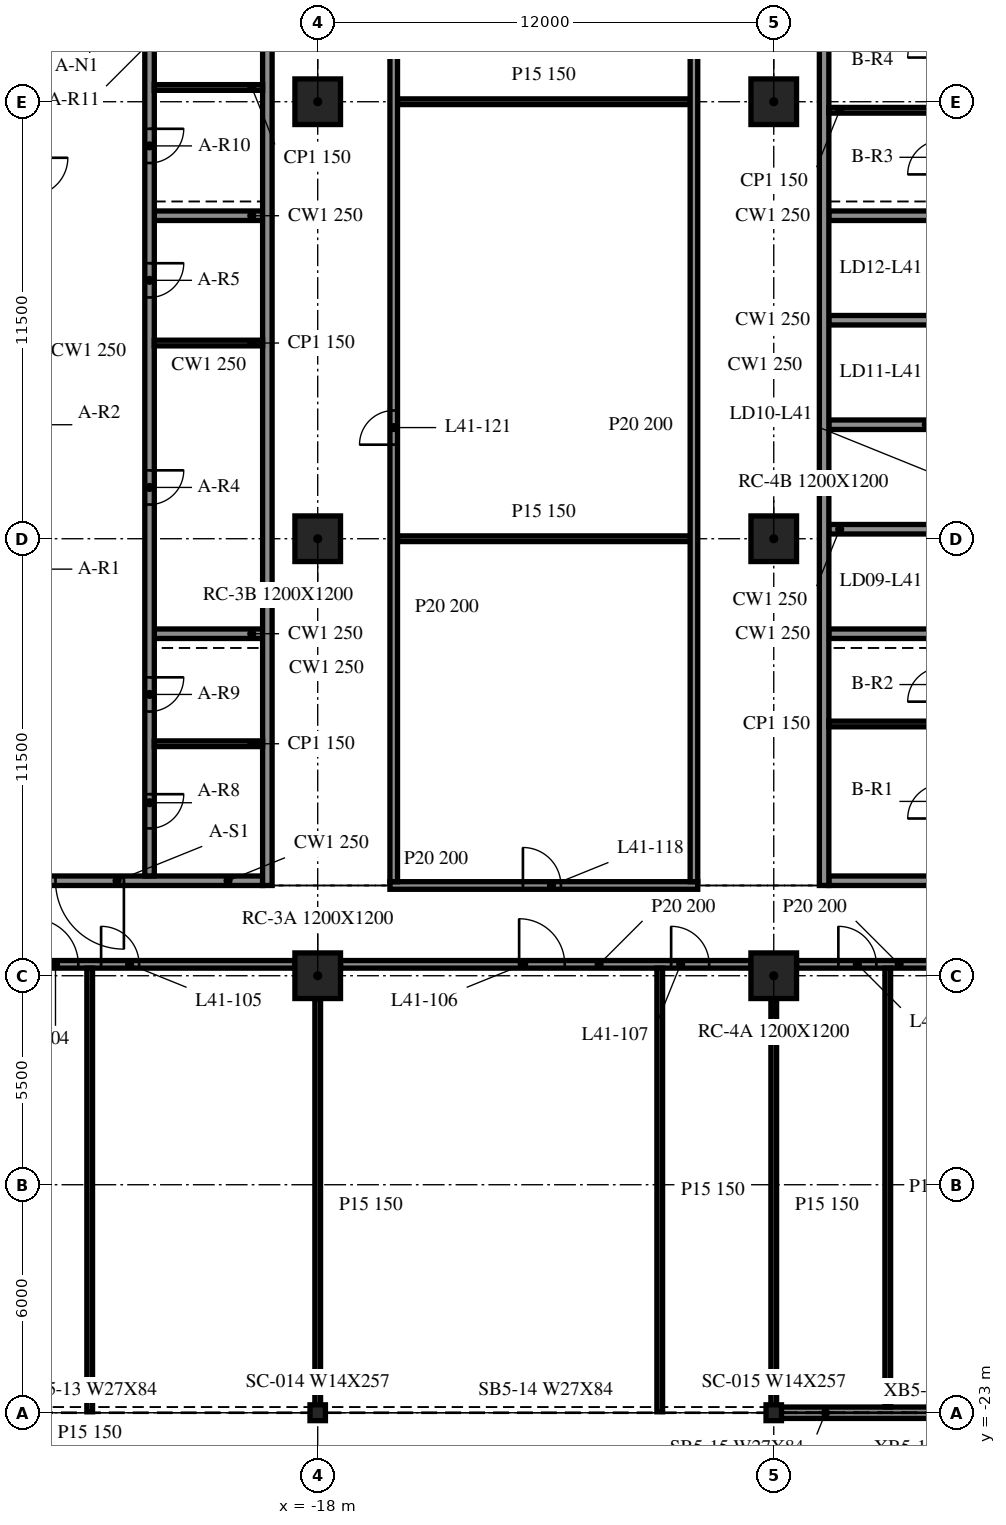
"""IFC4 building model, lengths in metres.
Left out: names, types, materials, properties, quantities, classifications, styles, units other than length and angle.
Written with IfcOpenShell. Run it as: python <this file> out.ifc"""

import sys

from ifc_helpers import new_model, si_unit, direction, frame, frame_2d, origin, origin_2d, place, context, subcontext, project, spatial, rectangle, i_section, extrude, element, fill, save


model = new_model("IFC4")
c1 = context("Model", 3, precision=1e-05, world=origin(), true_north=direction((0.0, 1.0)))
c2 = subcontext(c1, "Body", "Model", "MODEL_VIEW")
j1 = project(units=[si_unit("LENGTHUNIT", "METRE"), si_unit("PLANEANGLEUNIT", "RADIAN")], contexts=[c1])
p1 = place(None, origin())
s1 = spatial("IfcSite", under=j1, at=p1, CompositionType="ELEMENT")
p2 = place(p1, origin())
s2 = spatial("IfcBuilding", under=s1, at=p2, CompositionType="ELEMENT")
p3 = place(p2, frame((0.0, 0.0, 174.4)))
s3 = spatial("IfcBuildingStorey", under=s2, at=p3, CompositionType="ELEMENT", Elevation=174.4)
for number, where, z_axis, x_axis in (
    (1, (-18.0, -11.5, -0.34), (0.0, 0.0, 1.0), (1.0, 0.0, 0.0)),
    (2, (-18.0, 0.0, -0.34), (0.0, 0.0, 1.0), (1.0, 0.0, 0.0)),
    (3, (-18.0, 11.5, -0.34), (0.0, 0.0, 1.0), (1.0, 0.0, 0.0)),
    (4, (-6.0, -11.5, -0.34), (0.0, 0.0, 1.0), (1.0, 0.0, 0.0)),
    (5, (-6.0, 0.0, -0.34), (0.0, 0.0, 1.0), (1.0, 0.0, 0.0)),
    (6, (-6.0, 11.5, -0.34), (0.0, 0.0, 1.0), (1.0, 0.0, 0.0)),
):
    element("IfcColumn", number, at=place(p3, frame(where, z_axis=z_axis, x_axis=x_axis)), inside=s3, PredefinedType="COLUMN", context=c2, shape_type="SweptSolid", body=[
        extrude(rectangle(XDim=1.2, YDim=1.2, at=origin_2d()), origin(), (0.0, 0.0, 1.0), 3.8),
    ])
for number, where, z_axis, x_axis in (
    (7, (-18.0, -23.0, -0.34), (0.0, 0.0, 1.0), (1.0, 0.0, 0.0)),
    (8, (-6.0, -23.0, -0.34), (0.0, 0.0, 1.0), (1.0, 0.0, 0.0)),
):
    element("IfcColumn", number, at=place(p3, frame(where, z_axis=z_axis, x_axis=x_axis)), inside=s3, PredefinedType="COLUMN", context=c2, shape_type="SweptSolid", body=[
        extrude(i_section(OverallWidth=0.406, OverallDepth=0.417, WebThickness=0.03, FlangeThickness=0.048, at=origin_2d()), origin(), (0.0, 0.0, 1.0), 3.8),
    ])
p4 = place(p3, frame((-5.985, -23.0, 0.0), z_axis=(0.0, 0.0, 1.0), x_axis=(1.0, 0.0, 0.0)))
e9 = element("IfcWall", 9, at=p4, inside=s3, PredefinedType="NOTDEFINED", context=c2, shape_type="SweptSolid", body=[
    extrude(rectangle(XDim=11.97, YDim=0.3, at=frame_2d((5.985, 0.0))), origin(), (0.0, 0.0, 1.0), 2.782),
])
p5 = place(p3, frame((-19.325, -9.125, 0.0), z_axis=(0.0, 0.0, 1.0), x_axis=(0.0, 1.0, 0.0)))
e10 = element("IfcWall", 10, at=p5, inside=s3, PredefinedType="SOLIDWALL", context=c2, shape_type="SweptSolid", body=[
    extrude(rectangle(XDim=24.25, YDim=0.25, at=frame_2d((12.125, 0.0))), origin(), (0.0, 0.0, 1.0), 3.46),
])
p6 = place(p3, frame((-19.45, -9.0, 0.0), z_axis=(0.0, 0.0, 1.0), x_axis=(-1.0, 0.0, 0.0)))
e11 = element("IfcWall", 11, at=p6, inside=s3, PredefinedType="SOLIDWALL", context=c2, shape_type="SweptSolid", body=[
    extrude(rectangle(XDim=9.1, YDim=0.25, at=frame_2d((4.55, 0.0))), origin(), (0.0, 0.0, 1.0), 3.46),
])
p7 = place(p6, frame((3.65, 0.0, 0.0)))
e12 = element("IfcOpeningElement", 12, at=p7, cuts=e11, PredefinedType="OPENING", context=c2, shape_type="SweptSolid", body=[
    extrude(rectangle(XDim=1.8, YDim=2.1, at=frame_2d((0.9, 1.05))), frame((0.0, 0.135, 0.0), z_axis=(0.0, -1.0, 0.0), x_axis=(1.0, 0.0, 0.0)), (0.0, 0.0, 1.0), 0.27),
])
p8 = place(p3, frame((-22.425, 14.875, 0.0), z_axis=(0.0, 0.0, 1.0), x_axis=(0.0, -1.0, 0.0)))
e13 = element("IfcWall", 13, at=p8, inside=s3, PredefinedType="SOLIDWALL", context=c2, shape_type="SweptSolid", body=[
    extrude(rectangle(XDim=23.75, YDim=0.25, at=frame_2d((11.875, 0.0))), origin(), (0.0, 0.0, 1.0), 3.46),
])
p9 = place(p8, frame((13.075, 0.0, 0.0)))
e14 = element("IfcOpeningElement", 14, at=p9, cuts=e13, PredefinedType="OPENING", context=c2, shape_type="SweptSolid", body=[
    extrude(rectangle(XDim=0.9, YDim=2.1, at=frame_2d((0.45, 1.05))), frame((0.0, 0.135, 0.0), z_axis=(0.0, -1.0, 0.0), x_axis=(1.0, 0.0, 0.0)), (0.0, 0.0, 1.0), 0.27),
])
p10 = place(p8, frame((7.625, 0.0, 0.0)))
e15 = element("IfcOpeningElement", 15, at=p10, cuts=e13, PredefinedType="OPENING", context=c2, shape_type="SweptSolid", body=[
    extrude(rectangle(XDim=0.9, YDim=2.1, at=frame_2d((0.45, 1.05))), frame((0.0, 0.135, 0.0), z_axis=(0.0, -1.0, 0.0), x_axis=(1.0, 0.0, 0.0)), (0.0, 0.0, 1.0), 0.27),
])
p11 = place(p8, frame((21.597, 0.0, 0.0)))
e16 = element("IfcOpeningElement", 16, at=p11, cuts=e13, PredefinedType="OPENING", context=c2, shape_type="SweptSolid", body=[
    extrude(rectangle(XDim=0.9, YDim=2.1, at=frame_2d((0.45, 1.05))), frame((0.0, 0.135, 0.0), z_axis=(0.0, -1.0, 0.0), x_axis=(1.0, 0.0, 0.0)), (0.0, 0.0, 1.0), 0.27),
])
p12 = place(p8, frame((18.522, 0.0, 0.0)))
e17 = element("IfcOpeningElement", 17, at=p12, cuts=e13, PredefinedType="OPENING", context=c2, shape_type="SweptSolid", body=[
    extrude(rectangle(XDim=0.9, YDim=2.1, at=frame_2d((0.45, 1.05))), frame((0.0, 0.135, 0.0), z_axis=(0.0, -1.0, 0.0), x_axis=(1.0, 0.0, 0.0)), (0.0, 0.0, 1.0), 0.27),
])
p13 = place(p8, frame((4.087, 0.0, 0.0)))
e18 = element("IfcOpeningElement", 18, at=p13, cuts=e13, PredefinedType="OPENING", context=c2, shape_type="SweptSolid", body=[
    extrude(rectangle(XDim=0.9, YDim=2.1, at=frame_2d((0.45, 1.05))), frame((0.0, 0.135, 0.0), z_axis=(0.0, -1.0, 0.0), x_axis=(1.0, 0.0, 0.0)), (0.0, 0.0, 1.0), 0.27),
])
p14 = place(p8, frame((1.012, 0.0, 0.0)))
e19 = element("IfcOpeningElement", 19, at=p14, cuts=e13, PredefinedType="OPENING", context=c2, shape_type="SweptSolid", body=[
    extrude(rectangle(XDim=0.9, YDim=2.1, at=frame_2d((0.45, 1.05))), frame((0.0, 0.135, 0.0), z_axis=(0.0, -1.0, 0.0), x_axis=(1.0, 0.0, 0.0)), (0.0, 0.0, 1.0), 0.27),
])
for number, where, z_axis, x_axis in (
    (20, (-22.3, -2.5, 0.0), (0.0, 0.0, 1.0), (1.0, 0.0, 0.0)),
    (21, (-22.3, 8.5, 0.0), (0.0, 0.0, 1.0), (1.0, 0.0, 0.0)),
):
    element("IfcWall", number, at=place(p3, frame(where, z_axis=z_axis, x_axis=x_axis)), inside=s3, PredefinedType="SOLIDWALL", context=c2, shape_type="SweptSolid", body=[
        extrude(rectangle(XDim=2.85, YDim=0.25, at=frame_2d((1.425, 0.0))), origin(), (0.0, 0.0, 1.0), 3.46),
    ])
for number, where, z_axis, x_axis in (
    (22, (-22.3, 5.15, 0.0), (0.0, 0.0, 1.0), (1.0, 0.0, 0.0)),
    (23, (-22.3, -5.395, 0.0), (0.0, 0.0, 1.0), (1.0, 0.0, 0.0)),
    (24, (-22.3, 11.875, 0.0), (0.0, 0.0, 1.0), (1.0, 0.0, 0.0)),
):
    element("IfcWall", number, at=place(p3, frame(where, z_axis=z_axis, x_axis=x_axis)), inside=s3, PredefinedType="PARTITIONING", context=c2, shape_type="SweptSolid", body=[
        extrude(rectangle(XDim=2.85, YDim=0.15, at=frame_2d((1.425, 0.0))), origin(), (0.0, 0.0, 1.0), 3.46),
    ])
p15 = place(p3, frame((-4.675, 15.125, 0.0), z_axis=(0.0, 0.0, 1.0), x_axis=(0.0, -1.0, 0.0)))
e25 = element("IfcWall", 25, at=p15, inside=s3, PredefinedType="SOLIDWALL", context=c2, shape_type="SweptSolid", body=[
    extrude(rectangle(XDim=24.25, YDim=0.25, at=frame_2d((12.125, 0.0))), origin(), (0.0, 0.0, 1.0), 3.46),
])
p16 = place(p3, frame((4.55, -9.0, 0.0), z_axis=(0.0, 0.0, 1.0), x_axis=(-1.0, 0.0, 0.0)))
e26 = element("IfcWall", 26, at=p16, inside=s3, PredefinedType="SOLIDWALL", context=c2, shape_type="SweptSolid", body=[
    extrude(rectangle(XDim=9.1, YDim=0.25, at=frame_2d((4.55, 0.0))), origin(), (0.0, 0.0, 1.0), 3.46),
])
p17 = place(p16, frame((3.65, 0.0, 0.0)))
e27 = element("IfcOpeningElement", 27, at=p17, cuts=e26, PredefinedType="OPENING", context=c2, shape_type="SweptSolid", body=[
    extrude(rectangle(XDim=1.8, YDim=2.1, at=frame_2d((0.9, 1.05))), frame((0.0, 0.135, 0.0), z_axis=(0.0, -1.0, 0.0), x_axis=(1.0, 0.0, 0.0)), (0.0, 0.0, 1.0), 0.27),
])
for number, where, z_axis, x_axis in (
    (28, (-4.55, -2.5, 0.0), (0.0, 0.0, 1.0), (1.0, 0.0, 0.0)),
    (29, (-4.55, 0.25, 0.0), (0.0, 0.0, 1.0), (1.0, 0.0, 0.0)),
    (30, (-4.55, 3.0, 0.0), (0.0, 0.0, 1.0), (1.0, 0.0, 0.0)),
    (31, (-4.55, 5.75, 0.0), (0.0, 0.0, 1.0), (1.0, 0.0, 0.0)),
    (32, (-4.55, 8.5, 0.0), (0.0, 0.0, 1.0), (1.0, 0.0, 0.0)),
):
    element("IfcWall", number, at=place(p3, frame(where, z_axis=z_axis, x_axis=x_axis)), inside=s3, PredefinedType="SOLIDWALL", context=c2, shape_type="SweptSolid", body=[
        extrude(rectangle(XDim=2.85, YDim=0.25, at=frame_2d((1.425, 0.0))), origin(), (0.0, 0.0, 1.0), 3.46),
    ])
for number, where, z_axis, x_axis in (
    (33, (-4.55, -4.875, 0.0), (0.0, 0.0, 1.0), (1.0, 0.0, 0.0)),
    (34, (-4.55, 11.275, 0.0), (0.0, 0.0, 1.0), (1.0, 0.0, 0.0)),
):
    element("IfcWall", number, at=place(p3, frame(where, z_axis=z_axis, x_axis=x_axis)), inside=s3, PredefinedType="PARTITIONING", context=c2, shape_type="SweptSolid", body=[
        extrude(rectangle(XDim=2.85, YDim=0.15, at=frame_2d((1.425, 0.0))), origin(), (0.0, 0.0, 1.0), 3.46),
    ])
p18 = place(p3, frame((-29.4, -11.2, 0.0), z_axis=(0.0, 0.0, 1.0), x_axis=(1.0, 0.0, 0.0)))
e35 = element("IfcWall", 35, at=p18, inside=s3, PredefinedType="PARTITIONING", context=c2, shape_type="SweptSolid", body=[
    extrude(rectangle(XDim=10.8, YDim=0.2, at=frame_2d((5.4, 0.0))), origin(), (0.0, 0.0, 1.0), 3.46),
])
p19 = place(p18, frame((3.9, 0.0, 0.0)))
e36 = element("IfcOpeningElement", 36, at=p19, cuts=e35, PredefinedType="OPENING", context=c2, shape_type="SweptSolid", body=[
    extrude(rectangle(XDim=1.2, YDim=2.1, at=frame_2d((0.6, 1.05))), frame((0.0, 0.11, 0.0), z_axis=(0.0, -1.0, 0.0), x_axis=(1.0, 0.0, 0.0)), (0.0, 0.0, 1.0), 0.22),
])
p20 = place(p18, frame((5.7, 0.0, 0.0)))
e37 = element("IfcOpeningElement", 37, at=p20, cuts=e35, PredefinedType="OPENING", context=c2, shape_type="SweptSolid", body=[
    extrude(rectangle(XDim=1.0, YDim=2.1, at=frame_2d((0.5, 1.05))), frame((0.0, 0.11, 0.0), z_axis=(0.0, -1.0, 0.0), x_axis=(1.0, 0.0, 0.0)), (0.0, 0.0, 1.0), 0.22),
])
p21 = place(p3, frame((-17.4, -11.2, 0.0), z_axis=(0.0, 0.0, 1.0), x_axis=(1.0, 0.0, 0.0)))
e38 = element("IfcWall", 38, at=p21, inside=s3, PredefinedType="PARTITIONING", context=c2, shape_type="SweptSolid", body=[
    extrude(rectangle(XDim=10.8, YDim=0.2, at=frame_2d((5.4, 0.0))), origin(), (0.0, 0.0, 1.0), 3.46),
])
p22 = place(p21, frame((4.7, 0.0, 0.0)))
e39 = element("IfcOpeningElement", 39, at=p22, cuts=e38, PredefinedType="OPENING", context=c2, shape_type="SweptSolid", body=[
    extrude(rectangle(XDim=1.2, YDim=2.1, at=frame_2d((0.6, 1.05))), frame((0.0, 0.11, 0.0), z_axis=(0.0, -1.0, 0.0), x_axis=(1.0, 0.0, 0.0)), (0.0, 0.0, 1.0), 0.22),
])
p23 = place(p21, frame((8.7, 0.0, 0.0)))
e40 = element("IfcOpeningElement", 40, at=p23, cuts=e38, PredefinedType="OPENING", context=c2, shape_type="SweptSolid", body=[
    extrude(rectangle(XDim=1.0, YDim=2.1, at=frame_2d((0.5, 1.05))), frame((0.0, 0.11, 0.0), z_axis=(0.0, -1.0, 0.0), x_axis=(1.0, 0.0, 0.0)), (0.0, 0.0, 1.0), 0.22),
])
p24 = place(p3, frame((-5.4, -11.2, 0.0), z_axis=(0.0, 0.0, 1.0), x_axis=(1.0, 0.0, 0.0)))
e41 = element("IfcWall", 41, at=p24, inside=s3, PredefinedType="PARTITIONING", context=c2, shape_type="SweptSolid", body=[
    extrude(rectangle(XDim=10.8, YDim=0.2, at=frame_2d((5.4, 0.0))), origin(), (0.0, 0.0, 1.0), 3.46),
])
p25 = place(p24, frame((1.1, 0.0, 0.0)))
e42 = element("IfcOpeningElement", 42, at=p25, cuts=e41, PredefinedType="OPENING", context=c2, shape_type="SweptSolid", body=[
    extrude(rectangle(XDim=1.0, YDim=2.1, at=frame_2d((0.5, 1.05))), frame((0.0, 0.11, 0.0), z_axis=(0.0, -1.0, 0.0), x_axis=(1.0, 0.0, 0.0)), (0.0, 0.0, 1.0), 0.22),
])
p26 = place(p24, frame((4.9, 0.0, 0.0)))
e43 = element("IfcOpeningElement", 43, at=p26, cuts=e41, PredefinedType="OPENING", context=c2, shape_type="SweptSolid", body=[
    extrude(rectangle(XDim=1.0, YDim=2.1, at=frame_2d((0.5, 1.05))), frame((0.0, 0.11, 0.0), z_axis=(0.0, -1.0, 0.0), x_axis=(1.0, 0.0, 0.0)), (0.0, 0.0, 1.0), 0.22),
])
p27 = place(p3, frame((-16.1, -9.125, 0.0), z_axis=(0.0, 0.0, 1.0), x_axis=(1.0, 0.0, 0.0)))
e44 = element("IfcWall", 44, at=p27, inside=s3, PredefinedType="PARTITIONING", context=c2, shape_type="SweptSolid", body=[
    extrude(rectangle(XDim=8.1, YDim=0.2, at=frame_2d((4.05, 0.0))), origin(), (0.0, 0.0, 1.0), 3.46),
])
p28 = place(p27, frame((3.5, 0.0, 0.0)))
e45 = element("IfcOpeningElement", 45, at=p28, cuts=e44, PredefinedType="OPENING", context=c2, shape_type="SweptSolid", body=[
    extrude(rectangle(XDim=1.0, YDim=2.1, at=frame_2d((0.5, 1.05))), frame((0.0, 0.11, 0.0), z_axis=(0.0, -1.0, 0.0), x_axis=(1.0, 0.0, 0.0)), (0.0, 0.0, 1.0), 0.22),
])
for number, where, z_axis, x_axis in (
    (46, (-15.9, 0.0, 0.0), (0.0, 0.0, 1.0), (1.0, 0.0, 0.0)),
    (47, (-15.9, 11.5, 0.0), (0.0, 0.0, 1.0), (1.0, 0.0, 0.0)),
):
    element("IfcWall", number, at=place(p3, frame(where, z_axis=z_axis, x_axis=x_axis)), inside=s3, PredefinedType="PARTITIONING", context=c2, shape_type="SweptSolid", body=[
        extrude(rectangle(XDim=7.7, YDim=0.15, at=frame_2d((3.85, 0.0))), origin(), (0.0, 0.0, 1.0), 3.46),
    ])
p29 = place(p3, frame((-24.0, -22.975, 0.0), z_axis=(0.0, 0.0, 1.0), x_axis=(0.0, 1.0, 0.0)))
e48 = element("IfcWall", 48, at=p29, inside=s3, PredefinedType="PARTITIONING", context=c2, shape_type="SweptSolid", body=[
    extrude(rectangle(XDim=11.675, YDim=0.15, at=frame_2d((5.837, 0.0))), origin(), (0.0, 0.0, 1.0), 3.46),
])
p30 = place(p3, frame((-18.0, -22.975, 0.0), z_axis=(0.0, 0.0, 1.0), x_axis=(0.0, 1.0, 0.0)))
e49 = element("IfcWall", 49, at=p30, inside=s3, PredefinedType="PARTITIONING", context=c2, shape_type="SweptSolid", body=[
    extrude(rectangle(XDim=10.875, YDim=0.15, at=frame_2d((5.438, 0.0))), origin(), (0.0, 0.0, 1.0), 3.46),
])
p31 = place(p3, frame((-16.0, -9.025, 0.0), z_axis=(0.0, 0.0, 1.0), x_axis=(0.0, 1.0, 0.0)))
e50 = element("IfcWall", 50, at=p31, inside=s3, PredefinedType="PARTITIONING", context=c2, shape_type="SweptSolid", body=[
    extrude(rectangle(XDim=24.05, YDim=0.2, at=frame_2d((12.025, 0.0))), origin(), (0.0, 0.0, 1.0), 3.46),
])
p32 = place(p31, frame((11.5, 0.0, 0.0)))
e51 = element("IfcOpeningElement", 51, at=p32, cuts=e50, PredefinedType="OPENING", context=c2, shape_type="SweptSolid", body=[
    extrude(rectangle(XDim=0.9, YDim=2.1, at=frame_2d((0.45, 1.05))), frame((0.0, 0.11, 0.0), z_axis=(0.0, -1.0, 0.0), x_axis=(1.0, 0.0, 0.0)), (0.0, 0.0, 1.0), 0.22),
])
p33 = place(p3, frame((-9.0, -22.975, 0.0), z_axis=(0.0, 0.0, 1.0), x_axis=(0.0, 1.0, 0.0)))
e52 = element("IfcWall", 52, at=p33, inside=s3, PredefinedType="PARTITIONING", context=c2, shape_type="SweptSolid", body=[
    extrude(rectangle(XDim=11.675, YDim=0.15, at=frame_2d((5.837, 0.0))), origin(), (0.0, 0.0, 1.0), 3.46),
])
p34 = place(p3, frame((-8.1, -9.025, 0.0), z_axis=(0.0, 0.0, 1.0), x_axis=(0.0, 1.0, 0.0)))
e53 = element("IfcWall", 53, at=p34, inside=s3, PredefinedType="PARTITIONING", context=c2, shape_type="SweptSolid", body=[
    extrude(rectangle(XDim=24.05, YDim=0.2, at=frame_2d((12.025, 0.0))), origin(), (0.0, 0.0, 1.0), 3.46),
])
p35 = place(p3, frame((-6.0, -22.975, 0.0), z_axis=(0.0, 0.0, 1.0), x_axis=(0.0, 1.0, 0.0)))
e54 = element("IfcWall", 54, at=p35, inside=s3, PredefinedType="PARTITIONING", context=c2, shape_type="SweptSolid", body=[
    extrude(rectangle(XDim=10.875, YDim=0.15, at=frame_2d((5.438, 0.0))), origin(), (0.0, 0.0, 1.0), 3.46),
])
p36 = place(p3, frame((-3.0, -22.85, 0.0), z_axis=(0.0, 0.0, 1.0), x_axis=(0.0, 1.0, 0.0)))
e55 = element("IfcWall", 55, at=p36, inside=s3, PredefinedType="PARTITIONING", context=c2, shape_type="SweptSolid", body=[
    extrude(rectangle(XDim=11.55, YDim=0.15, at=frame_2d((5.775, 0.0))), origin(), (0.0, 0.0, 1.0), 3.46),
])
p37 = place(p7, origin())
e56 = element("IfcDoor", 56, at=p37, inside=s3, OperationType="DOUBLE_DOOR_SINGLE_SWING", PredefinedType="DOOR", context=c2, shape_type="SweptSolid", body=[
    extrude(rectangle(XDim=1.8, YDim=2.1, at=frame_2d((0.9, 1.05))), frame((0.0, 0.025, 0.0), z_axis=(0.0, -1.0, 0.0), x_axis=(1.0, 0.0, 0.0)), (0.0, 0.0, 1.0), 0.05),
])
fill(e12, e56)
p38 = place(p9, origin())
e57 = element("IfcDoor", 57, at=p38, inside=s3, OperationType="SINGLE_SWING_RIGHT", PredefinedType="DOOR", context=c2, shape_type="SweptSolid", body=[
    extrude(rectangle(XDim=0.9, YDim=2.1, at=frame_2d((0.45, 1.05))), frame((0.0, 0.025, 0.0), z_axis=(0.0, -1.0, 0.0), x_axis=(1.0, 0.0, 0.0)), (0.0, 0.0, 1.0), 0.05),
])
fill(e14, e57)
p39 = place(p10, origin())
e58 = element("IfcDoor", 58, at=p39, inside=s3, OperationType="SINGLE_SWING_LEFT", PredefinedType="DOOR", context=c2, shape_type="SweptSolid", body=[
    extrude(rectangle(XDim=0.9, YDim=2.1, at=frame_2d((0.45, 1.05))), frame((0.0, 0.025, 0.0), z_axis=(0.0, -1.0, 0.0), x_axis=(1.0, 0.0, 0.0)), (0.0, 0.0, 1.0), 0.05),
])
fill(e15, e58)
p40 = place(p11, origin())
e59 = element("IfcDoor", 59, at=p40, inside=s3, OperationType="SINGLE_SWING_RIGHT", PredefinedType="DOOR", context=c2, shape_type="SweptSolid", body=[
    extrude(rectangle(XDim=0.9, YDim=2.1, at=frame_2d((0.45, 1.05))), frame((0.0, 0.025, 0.0), z_axis=(0.0, -1.0, 0.0), x_axis=(1.0, 0.0, 0.0)), (0.0, 0.0, 1.0), 0.05),
])
fill(e16, e59)
p41 = place(p12, origin())
e60 = element("IfcDoor", 60, at=p41, inside=s3, OperationType="SINGLE_SWING_LEFT", PredefinedType="DOOR", context=c2, shape_type="SweptSolid", body=[
    extrude(rectangle(XDim=0.9, YDim=2.1, at=frame_2d((0.45, 1.05))), frame((0.0, 0.025, 0.0), z_axis=(0.0, -1.0, 0.0), x_axis=(1.0, 0.0, 0.0)), (0.0, 0.0, 1.0), 0.05),
])
fill(e17, e60)
p42 = place(p13, origin())
e61 = element("IfcDoor", 61, at=p42, inside=s3, OperationType="SINGLE_SWING_RIGHT", PredefinedType="DOOR", context=c2, shape_type="SweptSolid", body=[
    extrude(rectangle(XDim=0.9, YDim=2.1, at=frame_2d((0.45, 1.05))), frame((0.0, 0.025, 0.0), z_axis=(0.0, -1.0, 0.0), x_axis=(1.0, 0.0, 0.0)), (0.0, 0.0, 1.0), 0.05),
])
fill(e18, e61)
p43 = place(p19, origin())
e62 = element("IfcDoor", 62, at=p43, inside=s3, OperationType="SINGLE_SWING_RIGHT", PredefinedType="DOOR", context=c2, shape_type="SweptSolid", body=[
    extrude(rectangle(XDim=1.2, YDim=2.1, at=frame_2d((0.6, 1.05))), frame((0.0, 0.025, 0.0), z_axis=(0.0, -1.0, 0.0), x_axis=(1.0, 0.0, 0.0)), (0.0, 0.0, 1.0), 0.05),
])
fill(e36, e62)
p44 = place(p20, origin())
e63 = element("IfcDoor", 63, at=p44, inside=s3, OperationType="SINGLE_SWING_LEFT", PredefinedType="DOOR", context=c2, shape_type="SweptSolid", body=[
    extrude(rectangle(XDim=1.0, YDim=2.1, at=frame_2d((0.5, 1.05))), frame((0.0, 0.025, 0.0), z_axis=(0.0, -1.0, 0.0), x_axis=(1.0, 0.0, 0.0)), (0.0, 0.0, 1.0), 0.05),
])
fill(e37, e63)
p45 = place(p22, origin())
e64 = element("IfcDoor", 64, at=p45, inside=s3, OperationType="SINGLE_SWING_RIGHT", PredefinedType="DOOR", context=c2, shape_type="SweptSolid", body=[
    extrude(rectangle(XDim=1.2, YDim=2.1, at=frame_2d((0.6, 1.05))), frame((0.0, 0.025, 0.0), z_axis=(0.0, -1.0, 0.0), x_axis=(1.0, 0.0, 0.0)), (0.0, 0.0, 1.0), 0.05),
])
fill(e39, e64)
p46 = place(p23, origin())
e65 = element("IfcDoor", 65, at=p46, inside=s3, OperationType="SINGLE_SWING_LEFT", PredefinedType="DOOR", context=c2, shape_type="SweptSolid", body=[
    extrude(rectangle(XDim=1.0, YDim=2.1, at=frame_2d((0.5, 1.05))), frame((0.0, 0.025, 0.0), z_axis=(0.0, -1.0, 0.0), x_axis=(1.0, 0.0, 0.0)), (0.0, 0.0, 1.0), 0.05),
])
fill(e40, e65)
p47 = place(p25, origin())
e66 = element("IfcDoor", 66, at=p47, inside=s3, OperationType="SINGLE_SWING_RIGHT", PredefinedType="DOOR", context=c2, shape_type="SweptSolid", body=[
    extrude(rectangle(XDim=1.0, YDim=2.1, at=frame_2d((0.5, 1.05))), frame((0.0, 0.025, 0.0), z_axis=(0.0, -1.0, 0.0), x_axis=(1.0, 0.0, 0.0)), (0.0, 0.0, 1.0), 0.05),
])
fill(e42, e66)
p48 = place(p28, origin())
e67 = element("IfcDoor", 67, at=p48, inside=s3, OperationType="SINGLE_SWING_LEFT", PredefinedType="DOOR", context=c2, shape_type="SweptSolid", body=[
    extrude(rectangle(XDim=1.0, YDim=2.1, at=frame_2d((0.5, 1.05))), frame((0.0, 0.025, 0.0), z_axis=(0.0, -1.0, 0.0), x_axis=(1.0, 0.0, 0.0)), (0.0, 0.0, 1.0), 0.05),
])
fill(e45, e67)
p49 = place(p32, origin())
e68 = element("IfcDoor", 68, at=p49, inside=s3, OperationType="SINGLE_SWING_RIGHT", PredefinedType="DOOR", context=c2, shape_type="SweptSolid", body=[
    extrude(rectangle(XDim=0.9, YDim=2.1, at=frame_2d((0.45, 1.05))), frame((0.0, 0.025, 0.0), z_axis=(0.0, -1.0, 0.0), x_axis=(1.0, 0.0, 0.0)), (0.0, 0.0, 1.0), 0.05),
])
fill(e51, e68)
save(model, sys.argv[1])
